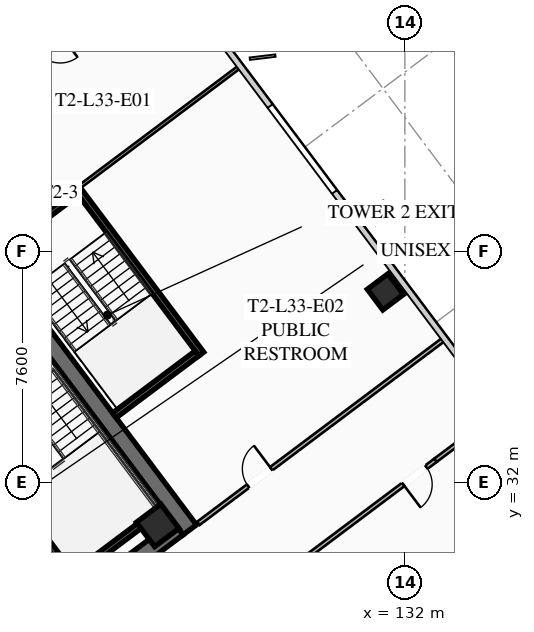
"""IFC4 building model, lengths in metres.
Left out: names, types, materials, properties, quantities, classifications, styles, units other than length and angle.
Written with IfcOpenShell. Run it as: python <this file> out.ifc"""

import sys

from ifc_helpers import new_model, si_unit, direction, frame, frame_2d, origin, origin_2d, place, context, subcontext, project, spatial, rectangle, hollow_rectangle, extrude, element, fill, save


model = new_model("IFC4")
c1 = context("Model", 3, precision=1e-05, world=origin(), true_north=direction((0.0, 1.0)))
c2 = subcontext(c1, "Body", "Model", "MODEL_VIEW")
j1 = project(units=[si_unit("LENGTHUNIT", "METRE"), si_unit("PLANEANGLEUNIT", "RADIAN")], contexts=[c1])
p1 = place(None, origin())
s1 = spatial("IfcSite", under=j1, at=p1, CompositionType="ELEMENT")
p2 = place(p1, origin())
s2 = spatial("IfcBuilding", under=s1, at=p2, CompositionType="ELEMENT")
p3 = place(p2, frame((0.0, 0.0, 125.05)))
s3 = spatial("IfcBuildingStorey", under=s2, at=p3, CompositionType="ELEMENT", Elevation=125.05)
p4 = place(p3, frame((115.564, 42.923, 0.0), z_axis=(0.0, 0.0, 1.0), x_axis=(0.600005007985, -0.799996243986, 0.0)))
e1 = element("IfcWall", 1, at=p4, inside=s3, PredefinedType="SHEAR", context=c2, shape_type="SweptSolid", body=[
    extrude(rectangle(XDim=15.6, YDim=0.55, at=frame_2d((7.8, 0.0))), origin(), (0.0, 0.0, 1.0), 3.55),
])
p5 = place(p3, frame((124.539, 30.498, 0.0), z_axis=(0.0, 0.0, 1.0), x_axis=(-0.799998054672, -0.600002593761, 0.0)))
e2 = element("IfcWall", 2, at=p5, inside=s3, PredefinedType="SHEAR", context=c2, shape_type="SweptSolid", body=[
    extrude(rectangle(XDim=15.06, YDim=0.55, at=frame_2d((7.53, 0.0))), origin(), (0.0, 0.0, 1.0), 3.55),
])
p6 = place(p5, frame((9.23, 0.0, 0.0)))
e3 = element("IfcOpeningElement", 3, at=p6, cuts=e2, PredefinedType="OPENING", context=c2, shape_type="SweptSolid", body=[
    extrude(rectangle(XDim=1.25, YDim=2.25, at=frame_2d((0.625, 1.125))), frame((0.0, 0.285, 0.0), z_axis=(0.0, -1.0, 0.0), x_axis=(1.0, 0.0, 0.0)), (0.0, 0.0, 1.0), 0.57),
])
p7 = place(p5, frame((4.18, 0.0, 0.0)))
e4 = element("IfcOpeningElement", 4, at=p7, cuts=e2, PredefinedType="OPENING", context=c2, shape_type="SweptSolid", body=[
    extrude(rectangle(XDim=1.25, YDim=2.25, at=frame_2d((0.625, 1.125))), frame((0.0, 0.285, 0.0), z_axis=(0.0, -1.0, 0.0), x_axis=(1.0, 0.0, 0.0)), (0.0, 0.0, 1.0), 0.57),
])
p8 = place(p3, frame((123.87, 30.59, 0.0), z_axis=(0.0, 0.0, 1.0), x_axis=(0.799999996291, 0.600000004945, 0.0)))
e5 = element("IfcColumn", 5, at=p8, inside=s3, PredefinedType="COLUMN", context=c2, shape_type="SweptSolid", body=[
    extrude(hollow_rectangle(XDim=1.0, YDim=1.0, WallThickness=0.04, at=origin_2d()), origin(), (0.0, 0.0, 1.0), 3.37),
])
p9 = place(p3, frame((131.36, 38.27, 0.0), z_axis=(0.0, 0.0, 1.0), x_axis=(0.799999996291, 0.600000004945, 0.0)))
e6 = element("IfcColumn", 6, at=p9, inside=s3, PredefinedType="COLUMN", context=c2, shape_type="SweptSolid", body=[
    extrude(hollow_rectangle(XDim=0.85, YDim=0.85, WallThickness=0.035, at=origin_2d()), origin(), (0.0, 0.0, 1.0), 3.37),
])
p10 = place(p3, frame((116.56, 34.92, 0.0), z_axis=(0.0, 0.0, 1.0), x_axis=(0.59999029481, -0.8000072788, 0.0)))
e7 = element("IfcWall", 7, at=p10, inside=s3, PredefinedType="SHEAR", context=c2, shape_type="SweptSolid", body=[
    extrude(rectangle(XDim=8.05, YDim=0.2, at=frame_2d((4.025, 0.0))), origin(), (0.0, 0.0, 1.0), 3.37),
])
p11 = place(p10, frame((0.45, 0.0, 0.0)))
e8 = element("IfcOpeningElement", 8, at=p11, cuts=e7, PredefinedType="OPENING", context=c2, shape_type="SweptSolid", body=[
    extrude(rectangle(XDim=1.15, YDim=2.2, at=frame_2d((0.575, 1.1))), frame((0.0, 0.11, 0.0), z_axis=(0.0, -1.0, 0.0), x_axis=(1.0, 0.0, 0.0)), (0.0, 0.0, 1.0), 0.22),
])
p12 = place(p3, frame((120.98, 28.86, 0.0), z_axis=(0.0, 0.0, 1.0), x_axis=(0.800015298837, 0.599979601008, 0.0)))
e9 = element("IfcWall", 9, at=p12, inside=s3, PredefinedType="SHEAR", context=c2, shape_type="SweptSolid", body=[
    extrude(rectangle(XDim=3.83, YDim=0.2, at=frame_2d((1.915, 0.0))), origin(), (0.0, 0.0, 1.0), 3.37),
])
p13 = place(p3, frame((125.304, 36.228, 0.0), z_axis=(0.0, 0.0, 1.0), x_axis=(-0.59998851072, 0.800008616831, 0.0)))
e10 = element("IfcWall", 10, at=p13, inside=s3, PredefinedType="SHEAR", context=c2, shape_type="SweptSolid", body=[
    extrude(rectangle(XDim=6.8, YDim=0.2, at=frame_2d((3.4, 0.0))), origin(), (0.0, 0.0, 1.0), 3.37),
])
p14 = place(p3, frame((121.204, 41.528, 0.0), z_axis=(0.0, 0.0, 1.0), x_axis=(-0.800017232136, -0.599977023131, 0.0)))
e11 = element("IfcWall", 11, at=p14, inside=s3, PredefinedType="SHEAR", context=c2, shape_type="SweptSolid", body=[
    extrude(rectangle(XDim=3.4, YDim=0.2, at=frame_2d((1.7, 0.0))), origin(), (0.0, 0.0, 1.0), 3.37),
])
p15 = place(p14, frame((1.975, 0.0, 0.0)))
e12 = element("IfcOpeningElement", 12, at=p15, cuts=e11, PredefinedType="OPENING", context=c2, shape_type="SweptSolid", body=[
    extrude(rectangle(XDim=1.15, YDim=2.2, at=frame_2d((0.575, 1.1))), frame((0.0, 0.11, 0.0), z_axis=(0.0, -1.0, 0.0), x_axis=(1.0, 0.0, 0.0)), (0.0, 0.0, 1.0), 0.22),
])
p16 = place(p3, frame((122.444, 34.208, 0.0), z_axis=(0.0, 0.0, 1.0), x_axis=(0.79999138319, 0.600011488909, 0.0)))
e13 = element("IfcWall", 13, at=p16, inside=s3, PredefinedType="SHEAR", context=c2, shape_type="SweptSolid", body=[
    extrude(rectangle(XDim=3.4, YDim=0.2, at=frame_2d((1.7, 0.0))), origin(), (0.0, 0.0, 1.0), 3.37),
])
p17 = place(p3, frame((95.81, 30.17, 0.0), z_axis=(0.0, 0.0, 1.0), x_axis=(0.8, 0.6, 0.0)))
e14 = element("IfcWall", 14, at=p17, inside=s3, PredefinedType="PARTITIONING", context=c2, shape_type="SweptSolid", body=[
    extrude(rectangle(XDim=31.3, YDim=0.135, at=frame_2d((15.65, 0.0))), origin(), (0.0, 0.0, 1.0), 2.723),
])
p18 = place(p17, frame((0.3, 0.0, 0.0)))
e15 = element("IfcOpeningElement", 15, at=p18, cuts=e14, PredefinedType="OPENING", context=c2, shape_type="SweptSolid", body=[
    extrude(rectangle(XDim=0.95, YDim=2.05, at=frame_2d((0.475, 1.025))), frame((0.0, 0.077, 0.0), z_axis=(0.0, -1.0, 0.0), x_axis=(1.0, 0.0, 0.0)), (0.0, 0.0, 1.0), 0.155),
])
p19 = place(p17, frame((15.438, 0.0, 0.0)))
e16 = element("IfcOpeningElement", 16, at=p19, cuts=e14, PredefinedType="OPENING", context=c2, shape_type="SweptSolid", body=[
    extrude(rectangle(XDim=0.95, YDim=2.05, at=frame_2d((0.475, 1.025))), frame((0.0, 0.077, 0.0), z_axis=(0.0, -1.0, 0.0), x_axis=(1.0, 0.0, 0.0)), (0.0, 0.0, 1.0), 0.155),
])
p20 = place(p17, frame((30.05, 0.0, 0.0)))
e17 = element("IfcOpeningElement", 17, at=p20, cuts=e14, PredefinedType="OPENING", context=c2, shape_type="SweptSolid", body=[
    extrude(rectangle(XDim=0.95, YDim=2.05, at=frame_2d((0.475, 1.025))), frame((0.0, 0.077, 0.0), z_axis=(0.0, -1.0, 0.0), x_axis=(1.0, 0.0, 0.0)), (0.0, 0.0, 1.0), 0.155),
])
p21 = place(p3, frame((133.012, 32.734, 0.0), z_axis=(0.0, 0.0, 1.0), x_axis=(-0.800003744006, -0.59999500796, 0.0)))
e18 = element("IfcWall", 18, at=p21, inside=s3, PredefinedType="PARTITIONING", context=c2, shape_type="SweptSolid", body=[
    extrude(rectangle(XDim=31.3, YDim=0.135, at=frame_2d((15.65, 0.0))), origin(), (0.0, 0.0, 1.0), 2.723),
])
p22 = place(p21, frame((29.97, 0.0, 0.0)))
e19 = element("IfcOpeningElement", 19, at=p22, cuts=e18, PredefinedType="OPENING", context=c2, shape_type="SweptSolid", body=[
    extrude(rectangle(XDim=0.95, YDim=2.05, at=frame_2d((0.475, 1.025))), frame((0.0, 0.077, 0.0), z_axis=(0.0, -1.0, 0.0), x_axis=(1.0, 0.0, 0.0)), (0.0, 0.0, 1.0), 0.155),
])
p23 = place(p21, frame((14.938, 0.0, 0.0)))
e20 = element("IfcOpeningElement", 20, at=p23, cuts=e18, PredefinedType="OPENING", context=c2, shape_type="SweptSolid", body=[
    extrude(rectangle(XDim=0.95, YDim=2.05, at=frame_2d((0.475, 1.025))), frame((0.0, 0.077, 0.0), z_axis=(0.0, -1.0, 0.0), x_axis=(1.0, 0.0, 0.0)), (0.0, 0.0, 1.0), 0.155),
])
p24 = place(p21, frame((0.38, 0.0, 0.0)))
e21 = element("IfcOpeningElement", 21, at=p24, cuts=e18, PredefinedType="OPENING", context=c2, shape_type="SweptSolid", body=[
    extrude(rectangle(XDim=0.95, YDim=2.05, at=frame_2d((0.475, 1.025))), frame((0.0, 0.077, 0.0), z_axis=(0.0, -1.0, 0.0), x_axis=(1.0, 0.0, 0.0)), (0.0, 0.0, 1.0), 0.155),
])
p25 = place(p3, frame((133.012, 32.734, 0.0), z_axis=(0.0, 0.0, 1.0), x_axis=(0.799977721118, 0.600029704027, 0.0)))
e22 = element("IfcWall", 22, at=p25, inside=s3, PredefinedType="PARTITIONING", context=c2, shape_type="SweptSolid", body=[
    extrude(rectangle(XDim=2.63, YDim=0.135, at=frame_2d((1.315, 0.0))), origin(), (0.0, 0.0, 1.0), 2.723),
])
p26 = place(p3, frame((123.944, 49.208, 0.0), z_axis=(0.0, 0.0, 1.0), x_axis=(-0.799996532921, -0.600004622744, 0.0)))
e23 = element("IfcWall", 23, at=p26, inside=s3, PredefinedType="PARTITIONING", context=c2, shape_type="SweptSolid", body=[
    extrude(rectangle(XDim=8.45, YDim=0.135, at=frame_2d((4.225, 0.0))), origin(), (0.0, 0.0, 1.0), 2.723),
])
p27 = place(p26, frame((4.1, 0.0, 0.0)))
e24 = element("IfcOpeningElement", 24, at=p27, cuts=e23, PredefinedType="OPENING", context=c2, shape_type="SweptSolid", body=[
    extrude(rectangle(XDim=0.95, YDim=2.05, at=frame_2d((0.475, 1.025))), frame((0.0, 0.077, 0.0), z_axis=(0.0, -1.0, 0.0), x_axis=(1.0, 0.0, 0.0)), (0.0, 0.0, 1.0), 0.155),
])
p28 = place(p3, frame((125.208, 30.656, 0.0), z_axis=(0.0, 0.0, 1.0), x_axis=(0.799997105034, 0.600003859935, 0.0)))
e25 = element("IfcWall", 25, at=p28, inside=s3, PredefinedType="PARTITIONING", context=c2, shape_type="SweptSolid", body=[
    extrude(rectangle(XDim=10.12, YDim=0.135, at=frame_2d((5.06, 0.0))), origin(), (0.0, 0.0, 1.0), 2.723),
])
p29 = place(p28, frame((2.045, 0.0, 0.0)))
e26 = element("IfcOpeningElement", 26, at=p29, cuts=e25, PredefinedType="OPENING", context=c2, shape_type="SweptSolid", body=[
    extrude(rectangle(XDim=0.95, YDim=2.05, at=frame_2d((0.475, 1.025))), frame((0.0, 0.077, 0.0), z_axis=(0.0, -1.0, 0.0), x_axis=(1.0, 0.0, 0.0)), (0.0, 0.0, 1.0), 0.155),
])
p30 = place(p3, frame((126.584, 45.688, 0.0), z_axis=(0.0, 0.0, 1.0), x_axis=(-0.800004438899, -0.599994081423, 0.0)))
e27 = element("IfcWall", 27, at=p30, inside=s3, PredefinedType="PARTITIONING", context=c2, shape_type="SweptSolid", body=[
    extrude(rectangle(XDim=6.6, YDim=0.11, at=frame_2d((3.3, 0.0))), origin(), (0.0, 0.0, 1.0), 2.723),
])
p31 = place(p24, origin())
e28 = element("IfcDoor", 28, at=p31, inside=s3, OperationType="SINGLE_SWING_RIGHT", PredefinedType="DOOR", context=c2, shape_type="SweptSolid", body=[
    extrude(rectangle(XDim=0.95, YDim=2.05, at=frame_2d((0.475, 1.025))), frame((0.0, 0.025, 0.0), z_axis=(0.0, -1.0, 0.0), x_axis=(1.0, 0.0, 0.0)), (0.0, 0.0, 1.0), 0.05),
])
fill(e21, e28)
p32 = place(p29, origin())
e29 = element("IfcDoor", 29, at=p32, inside=s3, OperationType="SINGLE_SWING_RIGHT", PredefinedType="DOOR", context=c2, shape_type="SweptSolid", body=[
    extrude(rectangle(XDim=0.95, YDim=2.05, at=frame_2d((0.475, 1.025))), frame((0.0, 0.025, 0.0), z_axis=(0.0, -1.0, 0.0), x_axis=(1.0, 0.0, 0.0)), (0.0, 0.0, 1.0), 0.05),
])
fill(e26, e29)
save(model, sys.argv[1])
